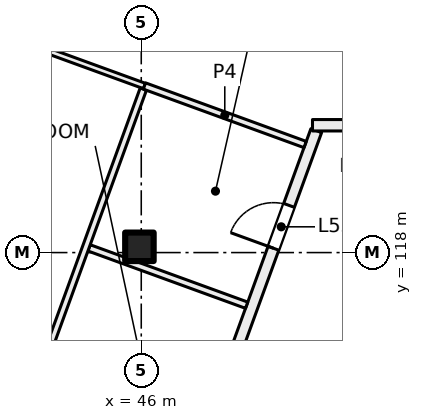
"""IFC4 building model, lengths in metres.
Left out: names, types, materials, properties, quantities, classifications, styles, units other than length and angle.
Written with IfcOpenShell. Run it as: python <this file> out.ifc"""

import sys

from ifc_helpers import new_model, si_unit, direction, frame, frame_2d, origin, origin_2d, place, context, subcontext, project, spatial, rectangle, extrude, element, fill, save


model = new_model("IFC4")
c1 = context("Model", 3, precision=1e-05, world=origin(), true_north=direction((0.0, 1.0)))
c2 = subcontext(c1, "Body", "Model", "MODEL_VIEW")
j1 = project(units=[si_unit("LENGTHUNIT", "METRE"), si_unit("PLANEANGLEUNIT", "RADIAN")], contexts=[c1])
p1 = place(None, origin())
s1 = spatial("IfcSite", under=j1, at=p1, CompositionType="ELEMENT")
p2 = place(p1, origin())
s2 = spatial("IfcBuilding", under=s1, at=p2, CompositionType="ELEMENT")
p3 = place(p2, frame((0.0, 0.0, 224.0)))
s3 = spatial("IfcBuildingStorey", under=s2, at=p3, CompositionType="ELEMENT", Elevation=224.0)
p4 = place(p3, frame((45.952, 118.152, 0.0), z_axis=(0.0, 0.0, 1.0), x_axis=(1.0, 0.0, 0.0)))
e1 = element("IfcColumn", 1, at=p4, inside=s3, PredefinedType="COLUMN", context=c2, shape_type="SweptSolid", body=[
    extrude(rectangle(XDim=0.75, YDim=0.75, at=origin_2d()), origin(), (0.0, 0.0, 1.0), 4.0),
])
p5 = place(p3, frame((34.431, 126.624, 0.0), z_axis=(0.0, 0.0, 1.0), x_axis=(0.939703144457, -0.341991228392, 0.0)))
e2 = element("IfcWall", 2, at=p5, inside=s3, PredefinedType="PARTITIONING", context=c2, shape_type="SweptSolid", body=[
    extrude(rectangle(XDim=12.401, YDim=0.15, at=frame_2d((6.2, 0.0))), origin(), (0.0, 0.0, 1.0), 3.625),
])
p6 = place(p3, frame((42.732, 99.579, 0.0), z_axis=(0.0, 0.0, 1.0), x_axis=(0.342036000593, 0.939686849061, 0.0)))
e3 = element("IfcWall", 3, at=p6, inside=s3, PredefinedType="PARTITIONING", context=c2, shape_type="SweptSolid", body=[
    extrude(rectangle(XDim=23.018, YDim=0.3, at=frame_2d((11.509, 0.0))), origin(), (0.0, 0.0, 1.0), 3.625),
])
p7 = place(p6, frame((15.225, 0.0, 0.0)))
e4 = element("IfcOpeningElement", 4, at=p7, cuts=e3, PredefinedType="OPENING", context=c2, shape_type="SweptSolid", body=[
    extrude(rectangle(XDim=1.2, YDim=2.1, at=frame_2d((0.6, 1.05))), frame((0.0, 0.16, 0.0), z_axis=(0.0, -1.0, 0.0), x_axis=(1.0, 0.0, 0.0)), (0.0, 0.0, 1.0), 0.32),
])
p8 = place(p6, frame((19.725, 0.0, 0.0)))
e5 = element("IfcOpeningElement", 5, at=p8, cuts=e3, PredefinedType="OPENING", context=c2, shape_type="SweptSolid", body=[
    extrude(rectangle(XDim=1.2, YDim=2.1, at=frame_2d((0.6, 1.05))), frame((0.0, 0.16, 0.0), z_axis=(0.0, -1.0, 0.0), x_axis=(1.0, 0.0, 0.0)), (0.0, 0.0, 1.0), 0.32),
])
p9 = place(p6, frame((5.925, 0.0, 0.0)))
e6 = element("IfcOpeningElement", 6, at=p9, cuts=e3, PredefinedType="OPENING", context=c2, shape_type="SweptSolid", body=[
    extrude(rectangle(XDim=1.8, YDim=2.1, at=frame_2d((0.9, 1.05))), frame((0.0, 0.16, 0.0), z_axis=(0.0, -1.0, 0.0), x_axis=(1.0, 0.0, 0.0)), (0.0, 0.0, 1.0), 0.32),
])
p10 = place(p3, frame((44.627, 118.124, 0.0), z_axis=(0.0, 0.0, 1.0), x_axis=(0.939691598517, -0.342022951975, 0.0)))
e7 = element("IfcWall", 7, at=p10, inside=s3, PredefinedType="PARTITIONING", context=c2, shape_type="SweptSolid", body=[
    extrude(rectangle(XDim=4.412, YDim=0.175, at=frame_2d((2.206, 0.0))), origin(), (0.0, 0.0, 1.0), 3.625),
])
p11 = place(p3, frame((46.054, 122.301, 0.0), z_axis=(0.0, 0.0, 1.0), x_axis=(-0.341963022424, -0.939713409128, 0.0)))
e8 = element("IfcWall", 8, at=p11, inside=s3, PredefinedType="PARTITIONING", context=c2, shape_type="SweptSolid", body=[
    extrude(rectangle(XDim=9.001, YDim=0.175, at=frame_2d((4.5, 0.0))), origin(), (0.0, 0.0, 1.0), 3.625),
])
p12 = place(p3, frame((50.312, 120.843, 0.0), z_axis=(0.0, 0.0, 1.0), x_axis=(-0.939609529273, 0.342248349154, 0.0)))
e9 = element("IfcWall", 9, at=p12, inside=s3, PredefinedType="PARTITIONING", context=c2, shape_type="SweptSolid", body=[
    extrude(rectangle(XDim=4.5, YDim=0.175, at=frame_2d((2.25, 0.0))), origin(), (0.0, 0.0, 1.0), 3.625),
])
p13 = place(p3, frame((50.506, 121.35, 0.0), z_axis=(0.0, 0.0, 1.0), x_axis=(1.0, 0.0, 0.0)))
e10 = element("IfcWall", 10, at=p13, inside=s3, PredefinedType="PARTITIONING", context=c2, shape_type="SweptSolid", body=[
    extrude(rectangle(XDim=35.319, YDim=0.3, at=frame_2d((17.659, 0.0))), origin(), (0.0, 0.0, 1.0), 3.625),
])
p14 = place(p13, frame((27.244, 0.0, 0.0)))
e11 = element("IfcOpeningElement", 11, at=p14, cuts=e10, PredefinedType="OPENING", context=c2, shape_type="SweptSolid", body=[
    extrude(rectangle(XDim=1.0, YDim=2.1, at=frame_2d((0.5, 1.05))), frame((0.0, 0.16, 0.0), z_axis=(0.0, -1.0, 0.0), x_axis=(1.0, 0.0, 0.0)), (0.0, 0.0, 1.0), 0.32),
])
p15 = place(p13, frame((23.394, 0.0, 0.0)))
e12 = element("IfcOpeningElement", 12, at=p15, cuts=e10, PredefinedType="OPENING", context=c2, shape_type="SweptSolid", body=[
    extrude(rectangle(XDim=1.2, YDim=2.1, at=frame_2d((0.6, 1.05))), frame((0.0, 0.16, 0.0), z_axis=(0.0, -1.0, 0.0), x_axis=(1.0, 0.0, 0.0)), (0.0, 0.0, 1.0), 0.32),
])
p16 = place(p13, frame((32.094, 0.0, 0.0)))
e13 = element("IfcOpeningElement", 13, at=p16, cuts=e10, PredefinedType="OPENING", context=c2, shape_type="SweptSolid", body=[
    extrude(rectangle(XDim=1.8, YDim=2.1, at=frame_2d((0.9, 1.05))), frame((0.0, 0.16, 0.0), z_axis=(0.0, -1.0, 0.0), x_axis=(1.0, 0.0, 0.0)), (0.0, 0.0, 1.0), 0.32),
])
p17 = place(p13, frame((16.744, 0.0, 0.0)))
e14 = element("IfcOpeningElement", 14, at=p17, cuts=e10, PredefinedType="OPENING", context=c2, shape_type="SweptSolid", body=[
    extrude(rectangle(XDim=1.0, YDim=2.1, at=frame_2d((0.5, 1.05))), frame((0.0, 0.16, 0.0), z_axis=(0.0, -1.0, 0.0), x_axis=(1.0, 0.0, 0.0)), (0.0, 0.0, 1.0), 0.32),
])
p18 = place(p13, frame((7.344, 0.0, 0.0)))
e15 = element("IfcOpeningElement", 15, at=p18, cuts=e10, PredefinedType="OPENING", context=c2, shape_type="SweptSolid", body=[
    extrude(rectangle(XDim=1.8, YDim=2.1, at=frame_2d((0.9, 1.05))), frame((0.0, 0.16, 0.0), z_axis=(0.0, -1.0, 0.0), x_axis=(1.0, 0.0, 0.0)), (0.0, 0.0, 1.0), 0.32),
])
p19 = place(p13, frame((1.047, 0.0, 0.0)))
e16 = element("IfcOpeningElement", 16, at=p19, cuts=e10, PredefinedType="OPENING", context=c2, shape_type="SweptSolid", body=[
    extrude(rectangle(XDim=1.8, YDim=2.1, at=frame_2d((0.9, 1.05))), frame((0.0, 0.16, 0.0), z_axis=(0.0, -1.0, 0.0), x_axis=(1.0, 0.0, 0.0)), (0.0, 0.0, 1.0), 0.32),
])
p20 = place(p8, origin())
e17 = element("IfcDoor", 17, at=p20, inside=s3, OperationType="DOUBLE_DOOR_SINGLE_SWING", PredefinedType="DOOR", context=c2, shape_type="SweptSolid", body=[
    extrude(rectangle(XDim=1.2, YDim=2.1, at=frame_2d((0.6, 1.05))), frame((0.0, 0.025, 0.0), z_axis=(0.0, -1.0, 0.0), x_axis=(1.0, 0.0, 0.0)), (0.0, 0.0, 1.0), 0.05),
])
fill(e5, e17)
save(model, sys.argv[1])
